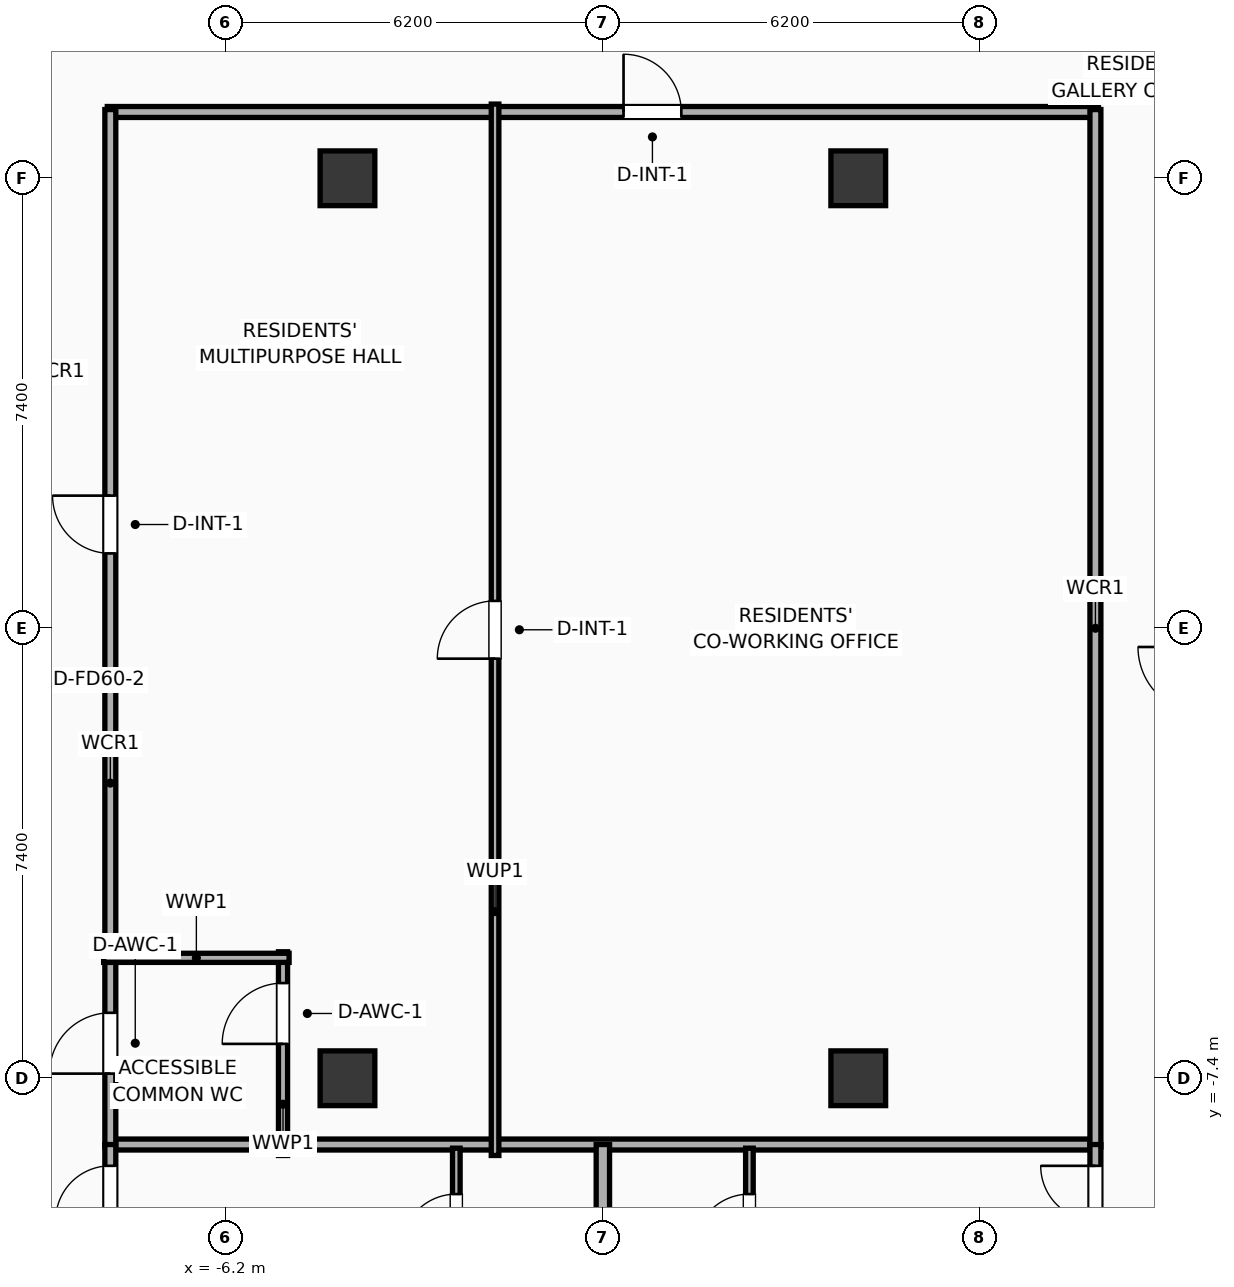
"""IFC4 building model, lengths in metres.
Left out: names, types, materials, properties, quantities, classifications, styles, units other than length and angle.
Written with IfcOpenShell. Run it as: python <this file> out.ifc"""

import sys

from ifc_helpers import new_model, si_unit, direction, frame, frame_2d, origin, origin_2d, place, context, subcontext, project, spatial, rectangle, extrude, element, fill, save


model = new_model("IFC4")
c1 = context("Model", 3, precision=1e-05, world=origin(), true_north=direction((0.0, 1.0)))
c2 = subcontext(c1, "Body", "Model", "MODEL_VIEW")
j1 = project(units=[si_unit("LENGTHUNIT", "METRE"), si_unit("PLANEANGLEUNIT", "RADIAN")], contexts=[c1])
p1 = place(None, origin())
s1 = spatial("IfcSite", under=j1, at=p1, CompositionType="ELEMENT")
p2 = place(p1, origin())
s2 = spatial("IfcBuilding", under=s1, at=p2, CompositionType="ELEMENT")
p3 = place(p2, frame((0.0, 0.0, 271.7)))
s3 = spatial("IfcBuildingStorey", under=s2, at=p3, CompositionType="ELEMENT", Elevation=271.7)
for number, where, z_axis, x_axis in (
    (1, (-4.2, -7.4, 0.0), (0.0, 0.0, 1.0), (1.0, 0.0, 0.0)),
    (2, (-4.2, 7.4, 0.0), (0.0, 0.0, 1.0), (1.0, 0.0, 0.0)),
    (3, (4.2, -7.4, 0.0), (0.0, 0.0, 1.0), (1.0, 0.0, 0.0)),
    (4, (4.2, 7.4, 0.0), (0.0, 0.0, 1.0), (1.0, 0.0, 0.0)),
):
    element("IfcColumn", number, at=place(p3, frame(where, z_axis=z_axis, x_axis=x_axis)), inside=s3, PredefinedType="COLUMN", context=c2, shape_type="SweptSolid", body=[
        extrude(rectangle(XDim=0.9, YDim=0.9, at=origin_2d()), origin(), (0.0, 0.0, 1.0), 3.9),
    ])
p4 = place(p3, frame((-8.15, 8.49, 0.0), z_axis=(0.0, 0.0, 1.0), x_axis=(1.0, 0.0, 0.0)))
e5 = element("IfcWall", 5, at=p4, inside=s3, PredefinedType="PARTITIONING", context=c2, shape_type="SweptSolid", body=[
    extrude(rectangle(XDim=16.3, YDim=0.18, at=frame_2d((8.15, 0.0))), origin(), (0.0, 0.0, 1.0), 3.65),
])
p5 = place(p4, frame((8.49, 0.0, 0.0)))
e6 = element("IfcOpeningElement", 6, at=p5, cuts=e5, PredefinedType="OPENING", context=c2, shape_type="SweptSolid", body=[
    extrude(rectangle(XDim=0.95, YDim=2.05, at=frame_2d((0.475, 1.025))), frame((0.0, 0.1, 0.0), z_axis=(0.0, -1.0, 0.0), x_axis=(1.0, 0.0, 0.0)), (0.0, 0.0, 1.0), 0.2),
])
p6 = place(p3, frame((-8.15, -8.49, 0.0), z_axis=(0.0, 0.0, 1.0), x_axis=(1.0, 0.0, 0.0)))
e7 = element("IfcWall", 7, at=p6, inside=s3, PredefinedType="PARTITIONING", context=c2, shape_type="SweptSolid", body=[
    extrude(rectangle(XDim=16.3, YDim=0.18, at=frame_2d((8.15, 0.0))), origin(), (0.0, 0.0, 1.0), 3.65),
])
p7 = place(p3, frame((-8.1, -8.53, 0.0), z_axis=(0.0, 0.0, 1.0), x_axis=(0.0, 1.0, 0.0)))
e8 = element("IfcWall", 8, at=p7, inside=s3, PredefinedType="PARTITIONING", context=c2, shape_type="SweptSolid", body=[
    extrude(rectangle(XDim=17.06, YDim=0.18, at=frame_2d((8.53, 0.0))), origin(), (0.0, 0.0, 1.0), 3.65),
])
p8 = place(p7, frame((1.206, 0.0, 0.0)))
e9 = element("IfcOpeningElement", 9, at=p8, cuts=e8, PredefinedType="OPENING", context=c2, shape_type="SweptSolid", body=[
    extrude(rectangle(XDim=1.0, YDim=2.05, at=frame_2d((0.5, 1.025))), frame((0.0, 0.1, 0.0), z_axis=(0.0, -1.0, 0.0), x_axis=(1.0, 0.0, 0.0)), (0.0, 0.0, 1.0), 0.2),
])
p9 = place(p7, frame((9.761, 0.0, 0.0)))
e10 = element("IfcOpeningElement", 10, at=p9, cuts=e8, PredefinedType="OPENING", context=c2, shape_type="SweptSolid", body=[
    extrude(rectangle(XDim=0.95, YDim=2.05, at=frame_2d((0.475, 1.025))), frame((0.0, 0.1, 0.0), z_axis=(0.0, -1.0, 0.0), x_axis=(1.0, 0.0, 0.0)), (0.0, 0.0, 1.0), 0.2),
])
p10 = place(p3, frame((8.1, -8.53, 0.0), z_axis=(0.0, 0.0, 1.0), x_axis=(0.0, 1.0, 0.0)))
e11 = element("IfcWall", 11, at=p10, inside=s3, PredefinedType="PARTITIONING", context=c2, shape_type="SweptSolid", body=[
    extrude(rectangle(XDim=17.06, YDim=0.18, at=frame_2d((8.53, 0.0))), origin(), (0.0, 0.0, 1.0), 3.65),
])
p11 = place(p3, frame((-5.26, -8.67, 0.0), z_axis=(0.0, 0.0, 1.0), x_axis=(0.0, 1.0, 0.0)))
e12 = element("IfcWall", 12, at=p11, inside=s3, PredefinedType="PLUMBINGWALL", context=c2, shape_type="SweptSolid", body=[
    extrude(rectangle(XDim=3.35, YDim=0.15, at=frame_2d((1.675, 0.0))), origin(), (0.0, 0.0, 1.0), 3.65),
])
p12 = place(p11, frame((1.835, 0.0, 0.0)))
e13 = element("IfcOpeningElement", 13, at=p12, cuts=e12, PredefinedType="OPENING", context=c2, shape_type="SweptSolid", body=[
    extrude(rectangle(XDim=1.0, YDim=2.05, at=frame_2d((0.5, 1.025))), frame((0.0, 0.085, 0.0), z_axis=(0.0, -1.0, 0.0), x_axis=(1.0, 0.0, 0.0)), (0.0, 0.0, 1.0), 0.17),
])
p13 = place(p3, frame((-8.21, -5.42, 0.0), z_axis=(0.0, 0.0, 1.0), x_axis=(1.0, 0.0, 0.0)))
e14 = element("IfcWall", 14, at=p13, inside=s3, PredefinedType="PLUMBINGWALL", context=c2, shape_type="SweptSolid", body=[
    extrude(rectangle(XDim=3.05, YDim=0.15, at=frame_2d((1.525, 0.0))), origin(), (0.0, 0.0, 1.0), 3.65),
])
p14 = place(p3, frame((-1.773, -8.67, 0.0), z_axis=(0.0, 0.0, 1.0), x_axis=(0.0, 1.0, 0.0)))
e15 = element("IfcWall", 15, at=p14, inside=s3, PredefinedType="PARTITIONING", context=c2, shape_type="SweptSolid", body=[
    extrude(rectangle(XDim=17.29, YDim=0.125, at=frame_2d((8.645, 0.0))), origin(), (0.0, 0.0, 1.0), 3.65),
])
p15 = place(p14, frame((8.17, 0.0, 0.0)))
e16 = element("IfcOpeningElement", 16, at=p15, cuts=e15, PredefinedType="OPENING", context=c2, shape_type="SweptSolid", body=[
    extrude(rectangle(XDim=0.95, YDim=2.05, at=frame_2d((0.475, 1.025))), frame((0.0, 0.073, 0.0), z_axis=(0.0, -1.0, 0.0), x_axis=(1.0, 0.0, 0.0)), (0.0, 0.0, 1.0), 0.145),
])
p16 = place(p3, frame((-2.41, -10.96, 0.0), z_axis=(0.0, 0.0, 1.0), x_axis=(0.0, 1.0, 0.0)))
e17 = element("IfcWall", 17, at=p16, inside=s3, PredefinedType="PARTITIONING", context=c2, shape_type="SweptSolid", body=[
    extrude(rectangle(XDim=2.41, YDim=0.125, at=frame_2d((1.205, 0.0))), origin(), (0.0, 0.0, 1.0), 3.65),
])
p17 = place(p16, frame((0.755, 0.0, 0.0)))
e18 = element("IfcOpeningElement", 18, at=p17, cuts=e17, PredefinedType="OPENING", context=c2, shape_type="SweptSolid", body=[
    extrude(rectangle(XDim=0.9, YDim=2.05, at=frame_2d((0.45, 1.025))), frame((0.0, 0.073, 0.0), z_axis=(0.0, -1.0, 0.0), x_axis=(1.0, 0.0, 0.0)), (0.0, 0.0, 1.0), 0.145),
])
p18 = place(p3, frame((-8.1, -18.155, 0.0), z_axis=(0.0, 0.0, 1.0), x_axis=(0.0, 1.0, 0.0)))
e19 = element("IfcWall", 19, at=p18, inside=s3, PredefinedType="PARTITIONING", context=c2, shape_type="SweptSolid", body=[
    extrude(rectangle(XDim=9.665, YDim=0.18, at=frame_2d((4.832, 0.0))), origin(), (0.0, 0.0, 1.0), 3.65),
])
p19 = place(p18, frame((8.414, 0.0, 0.0)))
e20 = element("IfcOpeningElement", 20, at=p19, cuts=e19, PredefinedType="OPENING", context=c2, shape_type="SweptSolid", body=[
    extrude(rectangle(XDim=0.9, YDim=2.05, at=frame_2d((0.45, 1.025))), frame((0.0, 0.1, 0.0), z_axis=(0.0, -1.0, 0.0), x_axis=(1.0, 0.0, 0.0)), (0.0, 0.0, 1.0), 0.2),
])
p20 = place(p3, frame((2.41, -10.96, 0.0), z_axis=(0.0, 0.0, 1.0), x_axis=(0.0, 1.0, 0.0)))
e21 = element("IfcWall", 21, at=p20, inside=s3, PredefinedType="PARTITIONING", context=c2, shape_type="SweptSolid", body=[
    extrude(rectangle(XDim=2.41, YDim=0.125, at=frame_2d((1.205, 0.0))), origin(), (0.0, 0.0, 1.0), 3.65),
])
p21 = place(p20, frame((0.755, 0.0, 0.0)))
e22 = element("IfcOpeningElement", 22, at=p21, cuts=e21, PredefinedType="OPENING", context=c2, shape_type="SweptSolid", body=[
    extrude(rectangle(XDim=0.9, YDim=2.05, at=frame_2d((0.45, 1.025))), frame((0.0, 0.073, 0.0), z_axis=(0.0, -1.0, 0.0), x_axis=(1.0, 0.0, 0.0)), (0.0, 0.0, 1.0), 0.145),
])
p22 = place(p3, frame((8.1, -19.857, 0.0), z_axis=(0.0, 0.0, 1.0), x_axis=(0.0, 1.0, 0.0)))
e23 = element("IfcWall", 23, at=p22, inside=s3, PredefinedType="PARTITIONING", context=c2, shape_type="SweptSolid", body=[
    extrude(rectangle(XDim=11.367, YDim=0.18, at=frame_2d((5.684, 0.0))), origin(), (0.0, 0.0, 1.0), 3.65),
])
p23 = place(p22, frame((10.117, 0.0, 0.0)))
e24 = element("IfcOpeningElement", 24, at=p23, cuts=e23, PredefinedType="OPENING", context=c2, shape_type="SweptSolid", body=[
    extrude(rectangle(XDim=0.9, YDim=2.05, at=frame_2d((0.45, 1.025))), frame((0.0, 0.1, 0.0), z_axis=(0.0, -1.0, 0.0), x_axis=(1.0, 0.0, 0.0)), (0.0, 0.0, 1.0), 0.2),
])
p24 = place(p3, frame((0.0, -19.006, 0.0), z_axis=(0.0, 0.0, 1.0), x_axis=(0.0, 1.0, 0.0)))
e25 = element("IfcWall", 25, at=p24, inside=s3, PredefinedType="PARTITIONING", context=c2, shape_type="SweptSolid", body=[
    extrude(rectangle(XDim=10.516, YDim=0.22, at=frame_2d((5.258, 0.0))), origin(), (0.0, 0.0, 1.0), 3.65),
])
p25 = place(p5, origin())
e26 = element("IfcDoor", 26, at=p25, inside=s3, OperationType="SINGLE_SWING_LEFT", PredefinedType="DOOR", context=c2, shape_type="SweptSolid", body=[
    extrude(rectangle(XDim=0.95, YDim=2.05, at=frame_2d((0.475, 1.025))), frame((0.0, 0.025, 0.0), z_axis=(0.0, -1.0, 0.0), x_axis=(1.0, 0.0, 0.0)), (0.0, 0.0, 1.0), 0.05),
])
fill(e6, e26)
p26 = place(p8, origin())
e27 = element("IfcDoor", 27, at=p26, inside=s3, OperationType="SINGLE_SWING_LEFT", PredefinedType="DOOR", context=c2, shape_type="SweptSolid", body=[
    extrude(rectangle(XDim=1.0, YDim=2.05, at=frame_2d((0.5, 1.025))), frame((0.0, 0.025, 0.0), z_axis=(0.0, -1.0, 0.0), x_axis=(1.0, 0.0, 0.0)), (0.0, 0.0, 1.0), 0.05),
])
fill(e9, e27)
p27 = place(p9, origin())
e28 = element("IfcDoor", 28, at=p27, inside=s3, OperationType="SINGLE_SWING_RIGHT", PredefinedType="DOOR", context=c2, shape_type="SweptSolid", body=[
    extrude(rectangle(XDim=0.95, YDim=2.05, at=frame_2d((0.475, 1.025))), frame((0.0, 0.025, 0.0), z_axis=(0.0, -1.0, 0.0), x_axis=(1.0, 0.0, 0.0)), (0.0, 0.0, 1.0), 0.05),
])
fill(e10, e28)
p28 = place(p12, origin())
e29 = element("IfcDoor", 29, at=p28, inside=s3, OperationType="SINGLE_SWING_LEFT", PredefinedType="DOOR", context=c2, shape_type="SweptSolid", body=[
    extrude(rectangle(XDim=1.0, YDim=2.05, at=frame_2d((0.5, 1.025))), frame((0.0, 0.025, 0.0), z_axis=(0.0, -1.0, 0.0), x_axis=(1.0, 0.0, 0.0)), (0.0, 0.0, 1.0), 0.05),
])
fill(e13, e29)
p29 = place(p15, origin())
e30 = element("IfcDoor", 30, at=p29, inside=s3, OperationType="SINGLE_SWING_LEFT", PredefinedType="DOOR", context=c2, shape_type="SweptSolid", body=[
    extrude(rectangle(XDim=0.95, YDim=2.05, at=frame_2d((0.475, 1.025))), frame((0.0, 0.025, 0.0), z_axis=(0.0, -1.0, 0.0), x_axis=(1.0, 0.0, 0.0)), (0.0, 0.0, 1.0), 0.05),
])
fill(e16, e30)
p30 = place(p17, origin())
e31 = element("IfcDoor", 31, at=p30, inside=s3, OperationType="SINGLE_SWING_LEFT", PredefinedType="DOOR", context=c2, shape_type="SweptSolid", body=[
    extrude(rectangle(XDim=0.9, YDim=2.05, at=frame_2d((0.45, 1.025))), frame((0.0, 0.025, 0.0), z_axis=(0.0, -1.0, 0.0), x_axis=(1.0, 0.0, 0.0)), (0.0, 0.0, 1.0), 0.05),
])
fill(e18, e31)
p31 = place(p19, origin())
e32 = element("IfcDoor", 32, at=p31, inside=s3, OperationType="SINGLE_SWING_LEFT", PredefinedType="DOOR", context=c2, shape_type="SweptSolid", body=[
    extrude(rectangle(XDim=0.9, YDim=2.05, at=frame_2d((0.45, 1.025))), frame((0.0, 0.025, 0.0), z_axis=(0.0, -1.0, 0.0), x_axis=(1.0, 0.0, 0.0)), (0.0, 0.0, 1.0), 0.05),
])
fill(e20, e32)
p32 = place(p21, origin())
e33 = element("IfcDoor", 33, at=p32, inside=s3, OperationType="SINGLE_SWING_LEFT", PredefinedType="DOOR", context=c2, shape_type="SweptSolid", body=[
    extrude(rectangle(XDim=0.9, YDim=2.05, at=frame_2d((0.45, 1.025))), frame((0.0, 0.025, 0.0), z_axis=(0.0, -1.0, 0.0), x_axis=(1.0, 0.0, 0.0)), (0.0, 0.0, 1.0), 0.05),
])
fill(e22, e33)
p33 = place(p23, origin())
e34 = element("IfcDoor", 34, at=p33, inside=s3, OperationType="SINGLE_SWING_RIGHT", PredefinedType="DOOR", context=c2, shape_type="SweptSolid", body=[
    extrude(rectangle(XDim=0.9, YDim=2.05, at=frame_2d((0.45, 1.025))), frame((0.0, 0.025, 0.0), z_axis=(0.0, -1.0, 0.0), x_axis=(1.0, 0.0, 0.0)), (0.0, 0.0, 1.0), 0.05),
])
fill(e24, e34)
save(model, sys.argv[1])
